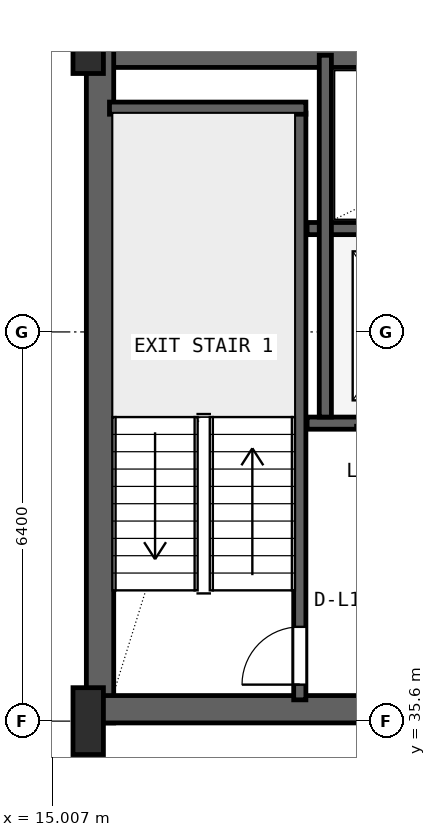
"""IFC4 building model, lengths in metres.
Left out: names, types, materials, properties, quantities, classifications, styles, units other than length and angle.
Written with IfcOpenShell. Run it as: python <this file> out.ifc"""

import sys

from ifc_helpers import new_model, si_unit, direction, frame, frame_2d, origin, origin_2d, place, context, subcontext, project, spatial, rectangle, i_section, extrude, source, transform, mapped, element, fill, save


model = new_model("IFC4")
c1 = context("Model", 3, precision=1e-05, world=origin(), true_north=direction((0.0, 1.0)))
c2 = subcontext(c1, "Body", "Model", "MODEL_VIEW")
j1 = project(units=[si_unit("LENGTHUNIT", "METRE"), si_unit("PLANEANGLEUNIT", "RADIAN")], contexts=[c1])
p1 = place(None, origin())
s1 = spatial("IfcSite", under=j1, at=p1, CompositionType="ELEMENT")
p2 = place(p1, origin())
s2 = spatial("IfcBuilding", under=s1, at=p2, CompositionType="ELEMENT")
p3 = place(p2, frame((0.0, 0.0, 62.7)))
s3 = spatial("IfcBuildingStorey", under=s2, at=p3, CompositionType="ELEMENT", Elevation=62.7)
p4 = place(p3, frame((15.6, 46.575, 0.0), z_axis=(0.0, 0.0, 1.0), x_axis=(1.0, 0.0, 0.0)))
e1 = element("IfcWall", 1, at=p4, inside=s3, PredefinedType="SHEAR", context=c2, shape_type="SweptSolid", body=[
    extrude(rectangle(XDim=36.8, YDim=0.45, at=frame_2d((18.4, 0.0))), origin(), (0.0, 0.0, 1.0), 3.65),
])
p5 = place(p3, frame((15.795, 35.57, 0.0), z_axis=(0.0, 0.0, 1.0), x_axis=(0.0, 1.0, 0.0)))
e2 = element("IfcWall", 2, at=p5, inside=s3, PredefinedType="SHEAR", context=c2, shape_type="SweptSolid", body=[
    extrude(rectangle(XDim=11.23, YDim=0.45, at=frame_2d((5.615, 0.0))), origin(), (0.0, 0.0, 1.0), 3.65),
])
p6 = place(p3, frame((15.57, 35.795, 0.0), z_axis=(0.0, 0.0, 1.0), x_axis=(1.0, 0.0, 0.0)))
e3 = element("IfcWall", 3, at=p6, inside=s3, PredefinedType="SHEAR", context=c2, shape_type="SweptSolid", body=[
    extrude(rectangle(XDim=9.23, YDim=0.45, at=frame_2d((4.615, 0.0))), origin(), (0.0, 0.0, 1.0), 3.65),
])
p7 = place(p6, frame((5.4, 0.0, 0.0)))
e4 = element("IfcOpeningElement", 4, at=p7, cuts=e3, PredefinedType="OPENING", context=c2, shape_type="SweptSolid", body=[
    extrude(rectangle(XDim=1.0, YDim=2.1, at=frame_2d((0.5, 1.05))), frame((0.0, 0.235, 0.0), z_axis=(0.0, -1.0, 0.0), x_axis=(1.0, 0.0, 0.0)), (0.0, 0.0, 1.0), 0.47),
])
m1 = source(origin(), c2, "Body", "SweptSolid", [
    extrude(i_section(OverallWidth=0.5, OverallDepth=1.1, WebThickness=0.018, FlangeThickness=0.032, FilletRadius=0.018, at=origin_2d()), origin(), (0.0, 0.0, 1.0), 3.9),
])
for number, where, z_axis, x_axis in (
    (5, (15.6, 35.6, 0.0), (0.0, 0.0, 1.0), (1.0, 0.0, 0.0)),
    (6, (15.6, 46.8, 0.0), (0.0, 0.0, 1.0), (1.0, 0.0, 0.0)),
):
    element("IfcColumn", number, at=place(p3, frame(where, z_axis=z_axis, x_axis=x_axis)), inside=s3, PredefinedType="COLUMN", context=c2, shape_type="MappedRepresentation", body=[
        mapped(m1, transform((0.0, 0.0, 0.0), x_axis=(1.0, 0.0, 0.0), y_axis=(0.0, 1.0, 0.0), z_axis=(0.0, 0.0, 1.0), scale=1.0)),
    ])
p8 = place(p3, frame((19.08, 35.95, 0.0), z_axis=(0.0, 0.0, 1.0), x_axis=(0.0, 1.0, 0.0)))
e7 = element("IfcWall", 7, at=p8, inside=s3, PredefinedType="SHEAR", context=c2, shape_type="SweptSolid", body=[
    extrude(rectangle(XDim=9.65, YDim=0.2, at=frame_2d((4.825, 0.0))), origin(), (0.0, 0.0, 1.0), 3.65),
])
p9 = place(p8, frame((0.25, 0.0, 0.0)))
e8 = element("IfcOpeningElement", 8, at=p9, cuts=e7, PredefinedType="OPENING", context=c2, shape_type="SweptSolid", body=[
    extrude(rectangle(XDim=0.95, YDim=2.1, at=frame_2d((0.475, 1.05))), frame((0.0, 0.11, 0.0), z_axis=(0.0, -1.0, 0.0), x_axis=(1.0, 0.0, 0.0)), (0.0, 0.0, 1.0), 0.22),
])
p10 = place(p3, frame((15.95, 45.68, 0.0), z_axis=(0.0, 0.0, 1.0), x_axis=(1.0, 0.0, 0.0)))
e9 = element("IfcWall", 9, at=p10, inside=s3, PredefinedType="SHEAR", context=c2, shape_type="SweptSolid", body=[
    extrude(rectangle(XDim=3.23, YDim=0.2, at=frame_2d((1.615, 0.0))), origin(), (0.0, 0.0, 1.0), 3.65),
])
p11 = place(p3, frame((19.2, 40.5, 0.0), z_axis=(0.0, 0.0, 1.0), x_axis=(1.0, 0.0, 0.0)))
e10 = element("IfcWall", 10, at=p11, inside=s3, PredefinedType="SHEAR", context=c2, shape_type="SweptSolid", body=[
    extrude(rectangle(XDim=5.52, YDim=0.2, at=frame_2d((2.76, 0.0))), origin(), (0.0, 0.0, 1.0), 3.65),
])
p12 = place(p11, frame((1.05, 0.0, 0.0)))
e11 = element("IfcOpeningElement", 11, at=p12, cuts=e10, PredefinedType="OPENING", context=c2, shape_type="SweptSolid", body=[
    extrude(rectangle(XDim=1.1, YDim=2.18, at=frame_2d((0.55, 1.09))), frame((0.0, 0.11, 0.0), z_axis=(0.0, -1.0, 0.0), x_axis=(1.0, 0.0, 0.0)), (0.0, 0.0, 1.0), 0.22),
])
p13 = place(p11, frame((3.65, 0.0, 0.0)))
e12 = element("IfcOpeningElement", 12, at=p13, cuts=e10, PredefinedType="OPENING", context=c2, shape_type="SweptSolid", body=[
    extrude(rectangle(XDim=1.1, YDim=2.18, at=frame_2d((0.55, 1.09))), frame((0.0, 0.11, 0.0), z_axis=(0.0, -1.0, 0.0), x_axis=(1.0, 0.0, 0.0)), (0.0, 0.0, 1.0), 0.22),
])
p14 = place(p3, frame((19.2, 43.7, 0.0), z_axis=(0.0, 0.0, 1.0), x_axis=(1.0, 0.0, 0.0)))
e13 = element("IfcWall", 13, at=p14, inside=s3, PredefinedType="SHEAR", context=c2, shape_type="SweptSolid", body=[
    extrude(rectangle(XDim=5.52, YDim=0.2, at=frame_2d((2.76, 0.0))), origin(), (0.0, 0.0, 1.0), 3.65),
])
p15 = place(p3, frame((19.5, 40.6, 0.0), z_axis=(0.0, 0.0, 1.0), x_axis=(0.0, 1.0, 0.0)))
e14 = element("IfcWall", 14, at=p15, inside=s3, PredefinedType="SHEAR", context=c2, shape_type="SweptSolid", body=[
    extrude(rectangle(XDim=5.95, YDim=0.2, at=frame_2d((2.975, 0.0))), origin(), (0.0, 0.0, 1.0), 3.65),
])
m2 = source(origin(), c2, "Body", "SweptSolid", [
    extrude(rectangle(XDim=0.95, YDim=2.1, at=frame_2d((0.475, 1.05))), frame((0.0, 0.025, 0.0), z_axis=(0.0, -1.0, 0.0), x_axis=(1.0, 0.0, 0.0)), (0.0, 0.0, 1.0), 0.05),
])
p16 = place(p9, origin())
e15 = element("IfcDoor", 15, at=p16, inside=s3, OperationType="SINGLE_SWING_LEFT", PredefinedType="DOOR", context=c2, shape_type="MappedRepresentation", body=[
    mapped(m2, transform((0.0, 0.0, 0.0), x_axis=(1.0, 0.0, 0.0), y_axis=(0.0, 1.0, 0.0), z_axis=(0.0, 0.0, 1.0), scale=1.0)),
])
fill(e8, e15)
save(model, sys.argv[1])
